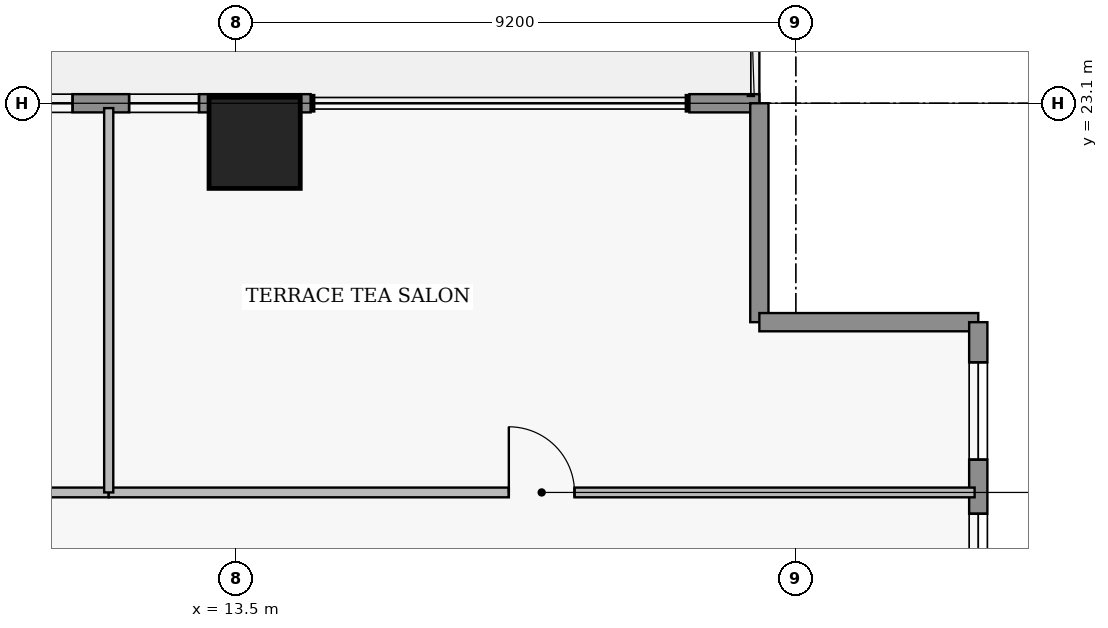
"""IFC4 building model, lengths in metres.
Left out: names, types, materials, properties, quantities, classifications, styles, units other than length and angle.
Written with IfcOpenShell. Run it as: python <this file> out.ifc"""

import sys

from ifc_helpers import new_model, si_unit, direction, frame, frame_2d, origin, origin_2d, place, context, subcontext, project, spatial, rectangle, extrude, element, fill, save


model = new_model("IFC4")
c1 = context("Model", 3, precision=1e-05, world=origin(), true_north=direction((0.0, 1.0)))
c2 = subcontext(c1, "Body", "Model", "MODEL_VIEW")
j1 = project(units=[si_unit("LENGTHUNIT", "METRE"), si_unit("PLANEANGLEUNIT", "RADIAN")], contexts=[c1])
p1 = place(None, origin())
s1 = spatial("IfcSite", under=j1, at=p1, CompositionType="ELEMENT")
p2 = place(p1, origin())
s2 = spatial("IfcBuilding", under=s1, at=p2, CompositionType="ELEMENT")
p3 = place(p2, frame((0.0, 0.0, 71.4)))
s3 = spatial("IfcBuildingStorey", under=s2, at=p3, CompositionType="ELEMENT", Elevation=71.4)
p4 = place(p3, frame((13.8, 22.45, 0.0), z_axis=(0.0, 0.0, 1.0), x_axis=(1.0, 0.0, 0.0)))
e1 = element("IfcColumn", 1, at=p4, inside=s3, PredefinedType="COLUMN", context=c2, shape_type="SweptSolid", body=[
    extrude(rectangle(XDim=1.5, YDim=1.5, at=origin_2d()), origin(), (0.0, 0.0, 1.0), 3.65),
])
p5 = place(p3, frame((3.68, 23.1, 0.0), z_axis=(0.0, 0.0, 1.0), x_axis=(1.0, 0.0, 0.0)))
e2 = element("IfcWall", 2, at=p5, inside=s3, PredefinedType="STANDARD", context=c2, shape_type="SweptSolid", body=[
    extrude(rectangle(XDim=11.04, YDim=0.3, at=frame_2d((5.52, 0.0))), origin(), (0.0, 0.0, 1.0), 3.43),
])
p6 = place(p5, frame((3.751, 0.0, 0.0)))
e3 = element("IfcOpeningElement", 3, at=p6, cuts=e2, PredefinedType="OPENING", context=c2, shape_type="SweptSolid", body=[
    extrude(rectangle(XDim=1.05, YDim=2.2, at=frame_2d((0.525, 1.1))), frame((0.0, 0.16, 0.0), z_axis=(0.0, -1.0, 0.0), x_axis=(1.0, 0.0, 0.0)), (0.0, 0.0, 1.0), 0.32),
])
p7 = place(p5, frame((1.986, 0.0, 0.95)))
e4 = element("IfcOpeningElement", 4, at=p7, cuts=e2, PredefinedType="OPENING", context=c2, shape_type="SweptSolid", body=[
    extrude(rectangle(XDim=1.15, YDim=1.55, at=frame_2d((0.575, 0.775))), frame((0.0, 0.16, 0.0), z_axis=(0.0, -1.0, 0.0), x_axis=(1.0, 0.0, 0.0)), (0.0, 0.0, 1.0), 0.32),
])
p8 = place(p5, frame((5.525, 0.0, 0.85)))
e5 = element("IfcOpeningElement", 5, at=p8, cuts=e2, PredefinedType="OPENING", context=c2, shape_type="SweptSolid", body=[
    extrude(rectangle(XDim=1.6, YDim=1.8, at=frame_2d((0.8, 0.9))), frame((0.0, 0.16, 0.0), z_axis=(0.0, -1.0, 0.0), x_axis=(1.0, 0.0, 0.0)), (0.0, 0.0, 1.0), 0.32),
])
p9 = place(p5, frame((8.055, 0.0, 0.95)))
e6 = element("IfcOpeningElement", 6, at=p9, cuts=e2, PredefinedType="OPENING", context=c2, shape_type="SweptSolid", body=[
    extrude(rectangle(XDim=1.15, YDim=1.55, at=frame_2d((0.575, 0.775))), frame((0.0, 0.16, 0.0), z_axis=(0.0, -1.0, 0.0), x_axis=(1.0, 0.0, 0.0)), (0.0, 0.0, 1.0), 0.32),
])
p10 = place(p3, frame((20.95, 23.1, 0.0), z_axis=(0.0, 0.0, 1.0), x_axis=(1.0, 0.0, 0.0)))
e7 = element("IfcWall", 7, at=p10, inside=s3, PredefinedType="STANDARD", context=c2, shape_type="SweptSolid", body=[
    extrude(rectangle(XDim=1.15, YDim=0.3, at=frame_2d((0.575, 0.0))), origin(), (0.0, 0.0, 1.0), 3.43),
])
p11 = place(p3, frame((22.1, 23.1, 0.0), z_axis=(0.0, 0.0, 1.0), x_axis=(0.0, -1.0, 0.0)))
e8 = element("IfcWall", 8, at=p11, inside=s3, PredefinedType="STANDARD", context=c2, shape_type="SweptSolid", body=[
    extrude(rectangle(XDim=3.6, YDim=0.3, at=frame_2d((1.8, 0.0))), origin(), (0.0, 0.0, 1.0), 3.43),
])
p12 = place(p3, frame((22.1, 19.5, 0.0), z_axis=(0.0, 0.0, 1.0), x_axis=(1.0, 0.0, 0.0)))
e9 = element("IfcWall", 9, at=p12, inside=s3, PredefinedType="STANDARD", context=c2, shape_type="SweptSolid", body=[
    extrude(rectangle(XDim=3.6, YDim=0.3, at=frame_2d((1.8, 0.0))), origin(), (0.0, 0.0, 1.0), 3.43),
])
p13 = place(p3, frame((25.7, 19.5, 0.0), z_axis=(0.0, 0.0, 1.0), x_axis=(0.0, -1.0, 0.0)))
e10 = element("IfcWall", 10, at=p13, inside=s3, PredefinedType="STANDARD", context=c2, shape_type="SweptSolid", body=[
    extrude(rectangle(XDim=5.1, YDim=0.3, at=frame_2d((2.55, 0.0))), origin(), (0.0, 0.0, 1.0), 3.43),
])
p14 = place(p13, frame((0.66, 0.0, 0.85)))
e11 = element("IfcOpeningElement", 11, at=p14, cuts=e10, PredefinedType="OPENING", context=c2, shape_type="SweptSolid", body=[
    extrude(rectangle(XDim=1.6, YDim=1.8, at=frame_2d((0.8, 0.9))), frame((0.0, 0.16, 0.0), z_axis=(0.0, -1.0, 0.0), x_axis=(1.0, 0.0, 0.0)), (0.0, 0.0, 1.0), 0.32),
])
p15 = place(p13, frame((3.15, 0.0, 0.95)))
e12 = element("IfcOpeningElement", 12, at=p15, cuts=e10, PredefinedType="OPENING", context=c2, shape_type="SweptSolid", body=[
    extrude(rectangle(XDim=1.15, YDim=1.55, at=frame_2d((0.575, 0.775))), frame((0.0, 0.16, 0.0), z_axis=(0.0, -1.0, 0.0), x_axis=(1.0, 0.0, 0.0)), (0.0, 0.0, 1.0), 0.32),
])
p16 = place(p3, frame((0.08, 16.7, 0.0), z_axis=(0.0, 0.0, 1.0), x_axis=(1.0, 0.0, 0.0)))
e13 = element("IfcWall", 13, at=p16, inside=s3, PredefinedType="PARTITIONING", context=c2, shape_type="SweptSolid", body=[
    extrude(rectangle(XDim=11.32, YDim=0.16, at=frame_2d((5.66, 0.0))), origin(), (0.0, 0.0, 1.0), 2.973),
])
p17 = place(p16, frame((6.31, 0.0, 0.0)))
e14 = element("IfcOpeningElement", 14, at=p17, cuts=e13, PredefinedType="OPENING", context=c2, shape_type="SweptSolid", body=[
    extrude(rectangle(XDim=1.0, YDim=2.15, at=frame_2d((0.5, 1.075))), frame((0.0, 0.09, 0.0), z_axis=(0.0, -1.0, 0.0), x_axis=(1.0, 0.0, 0.0)), (0.0, 0.0, 1.0), 0.18),
])
p18 = place(p3, frame((11.4, 16.7, 0.0), z_axis=(0.0, 0.0, 1.0), x_axis=(1.0, 0.0, 0.0)))
e15 = element("IfcWall", 15, at=p18, inside=s3, PredefinedType="PARTITIONING", context=c2, shape_type="SweptSolid", body=[
    extrude(rectangle(XDim=14.24, YDim=0.16, at=frame_2d((7.12, 0.0))), origin(), (0.0, 0.0, 1.0), 2.973),
])
p19 = place(p18, frame((6.58, 0.0, 0.0)))
e16 = element("IfcOpeningElement", 16, at=p19, cuts=e15, PredefinedType="OPENING", context=c2, shape_type="SweptSolid", body=[
    extrude(rectangle(XDim=1.08, YDim=2.18, at=frame_2d((0.54, 1.09))), frame((0.0, 0.09, 0.0), z_axis=(0.0, -1.0, 0.0), x_axis=(1.0, 0.0, 0.0)), (0.0, 0.0, 1.0), 0.18),
])
p20 = place(p3, frame((11.4, 16.7, 0.0), z_axis=(0.0, 0.0, 1.0), x_axis=(0.0, 1.0, 0.0)))
e17 = element("IfcWall", 17, at=p20, inside=s3, PredefinedType="PARTITIONING", context=c2, shape_type="SweptSolid", body=[
    extrude(rectangle(XDim=6.32, YDim=0.15, at=frame_2d((3.16, 0.0))), origin(), (0.0, 0.0, 1.0), 3.43),
])
p21 = place(p8, origin())
e18 = element("IfcWindow", 18, at=p21, inside=s3, PartitioningType="SINGLE_PANEL", PredefinedType="WINDOW", context=c2, shape_type="SweptSolid", body=[
    extrude(rectangle(XDim=1.6, YDim=1.8, at=frame_2d((0.8, 0.9))), frame((0.0, 0.03, 0.0), z_axis=(0.0, -1.0, 0.0), x_axis=(1.0, 0.0, 0.0)), (0.0, 0.0, 1.0), 0.06),
])
fill(e5, e18)
p22 = place(p9, origin())
e19 = element("IfcWindow", 19, at=p22, inside=s3, PartitioningType="SINGLE_PANEL", PredefinedType="WINDOW", context=c2, shape_type="SweptSolid", body=[
    extrude(rectangle(XDim=1.15, YDim=1.55, at=frame_2d((0.575, 0.775))), frame((0.0, 0.03, 0.0), z_axis=(0.0, -1.0, 0.0), x_axis=(1.0, 0.0, 0.0)), (0.0, 0.0, 1.0), 0.06),
])
fill(e6, e19)
p23 = place(p14, origin())
e20 = element("IfcWindow", 20, at=p23, inside=s3, PartitioningType="SINGLE_PANEL", PredefinedType="WINDOW", context=c2, shape_type="SweptSolid", body=[
    extrude(rectangle(XDim=1.6, YDim=1.8, at=frame_2d((0.8, 0.9))), frame((0.0, 0.03, 0.0), z_axis=(0.0, -1.0, 0.0), x_axis=(1.0, 0.0, 0.0)), (0.0, 0.0, 1.0), 0.06),
])
fill(e11, e20)
p24 = place(p15, origin())
e21 = element("IfcWindow", 21, at=p24, inside=s3, PartitioningType="SINGLE_PANEL", PredefinedType="WINDOW", context=c2, shape_type="SweptSolid", body=[
    extrude(rectangle(XDim=1.15, YDim=1.55, at=frame_2d((0.575, 0.775))), frame((0.0, 0.03, 0.0), z_axis=(0.0, -1.0, 0.0), x_axis=(1.0, 0.0, 0.0)), (0.0, 0.0, 1.0), 0.06),
])
fill(e12, e21)
p25 = place(p19, origin())
e22 = element("IfcDoor", 22, at=p25, inside=s3, OperationType="SINGLE_SWING_LEFT", PredefinedType="DOOR", context=c2, shape_type="SweptSolid", body=[
    extrude(rectangle(XDim=1.08, YDim=2.18, at=frame_2d((0.54, 1.09))), frame((0.0, 0.025, 0.0), z_axis=(0.0, -1.0, 0.0), x_axis=(1.0, 0.0, 0.0)), (0.0, 0.0, 1.0), 0.05),
])
fill(e16, e22)
save(model, sys.argv[1])
